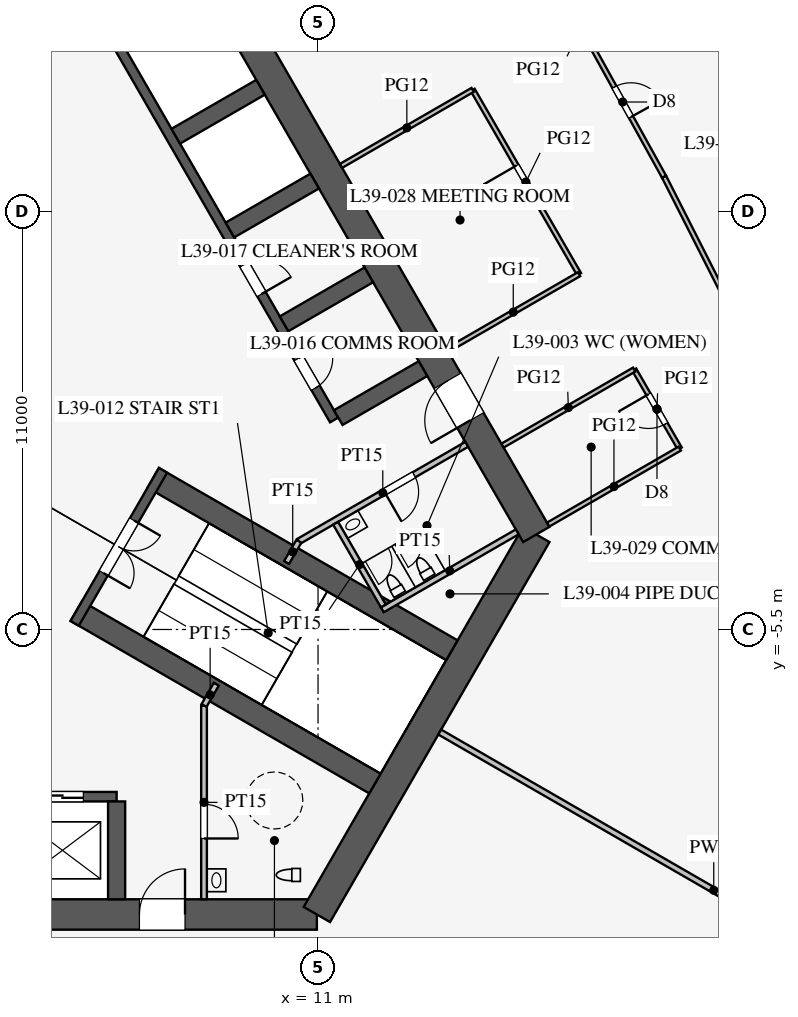
"""IFC4 building model, lengths in metres.
Left out: names, types, materials, properties, quantities, classifications, styles, units other than length and angle.
Written with IfcOpenShell. Run it as: python <this file> out.ifc"""

import sys

from ifc_helpers import new_model, si_unit, direction, frame, frame_2d, origin, place, context, subcontext, project, spatial, rectangle, extrude, element, fill, save


model = new_model("IFC4")
c1 = context("Model", 3, precision=1e-05, world=origin(), true_north=direction((0.0, 1.0)))
c2 = subcontext(c1, "Body", "Model", "MODEL_VIEW")
j1 = project(units=[si_unit("LENGTHUNIT", "METRE"), si_unit("PLANEANGLEUNIT", "RADIAN")], contexts=[c1])
p1 = place(None, origin())
s1 = spatial("IfcSite", under=j1, at=p1, CompositionType="ELEMENT")
p2 = place(p1, origin())
s2 = spatial("IfcBuilding", under=s1, at=p2, CompositionType="ELEMENT")
p3 = place(p2, frame((0.0, 0.0, 170.3)))
s3 = spatial("IfcBuildingStorey", under=s2, at=p3, CompositionType="ELEMENT", Elevation=170.3)
p4 = place(p3, frame((-10.97, -13.0, 0.0), z_axis=(0.0, 0.0, 1.0), x_axis=(1.0, 0.0, 0.0)))
e1 = element("IfcWall", 1, at=p4, inside=s3, PredefinedType="SHEAR", context=c2, shape_type="SweptSolid", body=[
    extrude(rectangle(XDim=21.939, YDim=0.8, at=frame_2d((10.97, 0.0))), origin(), (0.0, 0.0, 1.0), 4.2),
])
p5 = place(p4, frame((17.27, 0.0, 0.0)))
e2 = element("IfcOpeningElement", 2, at=p5, cuts=e1, PredefinedType="OPENING", context=c2, shape_type="SweptSolid", body=[
    extrude(rectangle(XDim=1.2, YDim=2.1, at=frame_2d((0.6, 1.05))), frame((0.0, 0.41, 0.0), z_axis=(0.0, -1.0, 0.0), x_axis=(1.0, 0.0, 0.0)), (0.0, 0.0, 1.0), 0.82),
])
p6 = place(p4, frame((3.47, 0.0, 0.0)))
e3 = element("IfcOpeningElement", 3, at=p6, cuts=e1, PredefinedType="OPENING", context=c2, shape_type="SweptSolid", body=[
    extrude(rectangle(XDim=1.2, YDim=2.1, at=frame_2d((0.6, 1.05))), frame((0.0, 0.41, 0.0), z_axis=(0.0, -1.0, 0.0), x_axis=(1.0, 0.0, 0.0)), (0.0, 0.0, 1.0), 0.82),
])
p7 = place(p3, frame((10.97, -13.0, 0.0), z_axis=(0.0, 0.0, 1.0), x_axis=(0.499995765644, 0.866027848477, 0.0)))
e4 = element("IfcWall", 4, at=p7, inside=s3, PredefinedType="SHEAR", context=c2, shape_type="SweptSolid", body=[
    extrude(rectangle(XDim=11.547, YDim=0.8, at=frame_2d((5.773, 0.0))), origin(), (0.0, 0.0, 1.0), 4.2),
])
p8 = place(p3, frame((16.743, -3.0, 0.0), z_axis=(0.0, 0.0, 1.0), x_axis=(-0.500002442456, 0.866023993627, 0.0)))
e5 = element("IfcWall", 5, at=p8, inside=s3, PredefinedType="SHEAR", context=c2, shape_type="SweptSolid", body=[
    extrude(rectangle(XDim=21.939, YDim=0.8, at=frame_2d((10.97, 0.0))), origin(), (0.0, 0.0, 1.0), 4.2),
])
p9 = place(p8, frame((17.27, 0.0, 0.0)))
e6 = element("IfcOpeningElement", 6, at=p9, cuts=e5, PredefinedType="OPENING", context=c2, shape_type="SweptSolid", body=[
    extrude(rectangle(XDim=1.2, YDim=2.1, at=frame_2d((0.6, 1.05))), frame((0.0, 0.41, 0.0), z_axis=(0.0, -1.0, 0.0), x_axis=(1.0, 0.0, 0.0)), (0.0, 0.0, 1.0), 0.82),
])
p10 = place(p8, frame((3.47, 0.0, 0.0)))
e7 = element("IfcOpeningElement", 7, at=p10, cuts=e5, PredefinedType="OPENING", context=c2, shape_type="SweptSolid", body=[
    extrude(rectangle(XDim=1.2, YDim=2.1, at=frame_2d((0.6, 1.05))), frame((0.0, 0.41, 0.0), z_axis=(0.0, -1.0, 0.0), x_axis=(1.0, 0.0, 0.0)), (0.0, 0.0, 1.0), 0.82),
])
p11 = place(p3, frame((-5.7, -9.9, 0.0), z_axis=(0.0, 0.0, 1.0), x_axis=(1.0, 0.0, 0.0)))
e8 = element("IfcWall", 8, at=p11, inside=s3, PredefinedType="SHEAR", context=c2, shape_type="SweptSolid", body=[
    extrude(rectangle(XDim=11.4, YDim=0.25, at=frame_2d((5.7, 0.0))), origin(), (0.0, 0.0, 1.0), 4.2),
])
p12 = place(p11, frame((0.875, 0.0, 0.0)))
e9 = element("IfcOpeningElement", 9, at=p12, cuts=e8, PredefinedType="OPENING", context=c2, shape_type="SweptSolid", body=[
    extrude(rectangle(XDim=1.1, YDim=2.2, at=frame_2d((0.55, 1.1))), frame((0.0, 0.135, 0.0), z_axis=(0.0, -1.0, 0.0), x_axis=(1.0, 0.0, 0.0)), (0.0, 0.0, 1.0), 0.27),
])
p13 = place(p11, frame((3.725, 0.0, 0.0)))
e10 = element("IfcOpeningElement", 10, at=p13, cuts=e8, PredefinedType="OPENING", context=c2, shape_type="SweptSolid", body=[
    extrude(rectangle(XDim=1.1, YDim=2.2, at=frame_2d((0.55, 1.1))), frame((0.0, 0.135, 0.0), z_axis=(0.0, -1.0, 0.0), x_axis=(1.0, 0.0, 0.0)), (0.0, 0.0, 1.0), 0.27),
])
p14 = place(p11, frame((6.575, 0.0, 0.0)))
e11 = element("IfcOpeningElement", 11, at=p14, cuts=e8, PredefinedType="OPENING", context=c2, shape_type="SweptSolid", body=[
    extrude(rectangle(XDim=1.1, YDim=2.2, at=frame_2d((0.55, 1.1))), frame((0.0, 0.135, 0.0), z_axis=(0.0, -1.0, 0.0), x_axis=(1.0, 0.0, 0.0)), (0.0, 0.0, 1.0), 0.27),
])
p15 = place(p11, frame((9.425, 0.0, 0.0)))
e12 = element("IfcOpeningElement", 12, at=p15, cuts=e8, PredefinedType="OPENING", context=c2, shape_type="SweptSolid", body=[
    extrude(rectangle(XDim=1.1, YDim=2.2, at=frame_2d((0.55, 1.1))), frame((0.0, 0.135, 0.0), z_axis=(0.0, -1.0, 0.0), x_axis=(1.0, 0.0, 0.0)), (0.0, 0.0, 1.0), 0.27),
])
p16 = place(p3, frame((5.7, -10.025, 0.0), z_axis=(0.0, 0.0, 1.0), x_axis=(0.0, -1.0, 0.0)))
e13 = element("IfcWall", 13, at=p16, inside=s3, PredefinedType="SHEAR", context=c2, shape_type="SweptSolid", body=[
    extrude(rectangle(XDim=2.575, YDim=0.45, at=frame_2d((1.288, 0.0))), origin(), (0.0, 0.0, 1.0), 4.2),
])
p17 = place(p3, frame((11.424, 0.014, 0.0), z_axis=(0.0, 0.0, 1.0), x_axis=(-0.500001763848, 0.866024385424, 0.0)))
e14 = element("IfcWall", 14, at=p17, inside=s3, PredefinedType="SHEAR", context=c2, shape_type="SweptSolid", body=[
    extrude(rectangle(XDim=11.4, YDim=0.25, at=frame_2d((5.7, 0.0))), origin(), (0.0, 0.0, 1.0), 4.2),
])
p18 = place(p17, frame((0.975, 0.0, 0.0)))
e15 = element("IfcOpeningElement", 15, at=p18, cuts=e14, PredefinedType="OPENING", context=c2, shape_type="SweptSolid", body=[
    extrude(rectangle(XDim=0.9, YDim=2.1, at=frame_2d((0.45, 1.05))), frame((0.0, 0.135, 0.0), z_axis=(0.0, -1.0, 0.0), x_axis=(1.0, 0.0, 0.0)), (0.0, 0.0, 1.0), 0.27),
])
p19 = place(p17, frame((3.825, 0.0, 0.0)))
e16 = element("IfcOpeningElement", 16, at=p19, cuts=e14, PredefinedType="OPENING", context=c2, shape_type="SweptSolid", body=[
    extrude(rectangle(XDim=0.9, YDim=2.1, at=frame_2d((0.45, 1.05))), frame((0.0, 0.135, 0.0), z_axis=(0.0, -1.0, 0.0), x_axis=(1.0, 0.0, 0.0)), (0.0, 0.0, 1.0), 0.27),
])
for number, where, z_axis, x_axis in (
    (17, (11.532, 0.076, 0.0), (0.0, 0.0, 1.0), (0.866, 0.5, 0.0)),
    (18, (10.107, 2.544, 0.0), (0.0, 0.0, 1.0), (0.866, 0.5, 0.0)),
    (19, (8.682, 5.012, 0.0), (0.0, 0.0, 1.0), (0.866, 0.5, 0.0)),
    (20, (7.257, 7.481, 0.0), (0.0, 0.0, 1.0), (0.866, 0.5, 0.0)),
):
    element("IfcWall", number, at=place(p3, frame(where, z_axis=z_axis, x_axis=x_axis)), inside=s3, PredefinedType="SHEAR", context=c2, shape_type="SweptSolid", body=[
        extrude(rectangle(XDim=2.575, YDim=0.45, at=frame_2d((1.288, 0.0))), origin(), (0.0, 0.0, 1.0), 4.2),
    ])
for number, where, z_axis, x_axis in (
    (21, (4.638, -5.016, 0.0), (0.0, 0.0, 1.0), (0.866, -0.5, 0.0)),
    (22, (6.663, -1.509, 0.0), (0.0, 0.0, 1.0), (0.866, -0.5, 0.0)),
):
    element("IfcWall", number, at=place(p3, frame(where, z_axis=z_axis, x_axis=x_axis)), inside=s3, PredefinedType="SHEAR", context=c2, shape_type="SweptSolid", body=[
        extrude(rectangle(XDim=9.075, YDim=0.6, at=frame_2d((4.538, 0.0))), origin(), (0.0, 0.0, 1.0), 4.2),
    ])
p20 = place(p3, frame((4.597, -5.339, 0.0), z_axis=(0.0, 0.0, 1.0), x_axis=(0.499984536904, 0.866034331223, 0.0)))
e23 = element("IfcWall", 23, at=p20, inside=s3, PredefinedType="SHEAR", context=c2, shape_type="SweptSolid", body=[
    extrude(rectangle(XDim=4.65, YDim=0.25, at=frame_2d((2.325, 0.0))), origin(), (0.0, 0.0, 1.0), 4.2),
])
p21 = place(p20, frame((1.525, 0.0, 0.0)))
e24 = element("IfcOpeningElement", 24, at=p21, cuts=e23, PredefinedType="OPENING", context=c2, shape_type="SweptSolid", body=[
    extrude(rectangle(XDim=1.6, YDim=2.1, at=frame_2d((0.8, 1.05))), frame((0.0, 0.135, 0.0), z_axis=(0.0, -1.0, 0.0), x_axis=(1.0, 0.0, 0.0)), (0.0, 0.0, 1.0), 0.27),
])
p22 = place(p3, frame((8.0, -7.5, 0.0), z_axis=(0.0, 0.0, 1.0), x_axis=(0.0, -1.0, 0.0)))
e25 = element("IfcWall", 25, at=p22, inside=s3, PredefinedType="PARTITIONING", context=c2, shape_type="SweptSolid", body=[
    extrude(rectangle(XDim=5.1, YDim=0.15, at=frame_2d((2.55, 0.0))), origin(), (0.0, 0.0, 1.0), 4.0),
])
p23 = place(p22, frame((2.6, 0.0, 0.0)))
e26 = element("IfcOpeningElement", 26, at=p23, cuts=e25, PredefinedType="OPENING", context=c2, shape_type="SweptSolid", body=[
    extrude(rectangle(XDim=0.9, YDim=2.1, at=frame_2d((0.45, 1.05))), frame((0.0, 0.085, 0.0), z_axis=(0.0, -1.0, 0.0), x_axis=(1.0, 0.0, 0.0)), (0.0, 0.0, 1.0), 0.17),
])
p24 = place(p3, frame((10.495, -3.178, 0.0), z_axis=(0.0, 0.0, 1.0), x_axis=(0.86602216432, 0.500005610874, 0.0)))
e27 = element("IfcWall", 27, at=p24, inside=s3, PredefinedType="PARTITIONING", context=c2, shape_type="SweptSolid", body=[
    extrude(rectangle(XDim=5.1, YDim=0.15, at=frame_2d((2.55, 0.0))), origin(), (0.0, 0.0, 1.0), 4.0),
])
p25 = place(p24, frame((2.6, 0.0, 0.0)))
e28 = element("IfcOpeningElement", 28, at=p25, cuts=e27, PredefinedType="OPENING", context=c2, shape_type="SweptSolid", body=[
    extrude(rectangle(XDim=0.9, YDim=2.1, at=frame_2d((0.45, 1.05))), frame((0.0, 0.085, 0.0), z_axis=(0.0, -1.0, 0.0), x_axis=(1.0, 0.0, 0.0)), (0.0, 0.0, 1.0), 0.17),
])
for number, where, z_axis, x_axis in (
    (29, (8.0, -7.5, 0.0), (0.0, 0.0, 1.0), (0.5, 0.866, 0.0)),
    (30, (10.495, -3.178, 0.0), (0.0, 0.0, 1.0), (-0.5, -0.866, 0.0)),
):
    element("IfcWall", number, at=place(p3, frame(where, z_axis=z_axis, x_axis=x_axis)), inside=s3, PredefinedType="PARTITIONING", context=c2, shape_type="SweptSolid", body=[
        extrude(rectangle(XDim=0.645, YDim=0.15, at=frame_2d((0.323, 0.0))), origin(), (0.0, 0.0, 1.0), 4.0),
    ])
p26 = place(p3, frame((12.691, -4.982, 0.0), z_axis=(0.0, 0.0, 1.0), x_axis=(0.8660249478, 0.500000789788, 0.0)))
e31 = element("IfcWall", 31, at=p26, inside=s3, PredefinedType="PARTITIONING", context=c2, shape_type="SweptSolid", body=[
    extrude(rectangle(XDim=4.1, YDim=0.15, at=frame_2d((2.05, 0.0))), origin(), (0.0, 0.0, 1.0), 4.0),
])
p27 = place(p3, frame((11.464, -2.706, 0.0), z_axis=(0.0, 0.0, 1.0), x_axis=(0.50001992892, -0.866013897511, 0.0)))
e32 = element("IfcWall", 32, at=p27, inside=s3, PredefinedType="PARTITIONING", context=c2, shape_type="SweptSolid", body=[
    extrude(rectangle(XDim=2.51, YDim=0.15, at=frame_2d((1.255, 0.0))), origin(), (0.0, 0.0, 1.0), 4.0),
])
p28 = place(p3, frame((14.203, -8.2, 0.0), z_axis=(0.0, 0.0, 1.0), x_axis=(0.866024668836, -0.500001272966, 0.0)))
e33 = element("IfcWall", 33, at=p28, inside=s3, PredefinedType="PARTITIONING", context=c2, shape_type="SweptSolid", body=[
    extrude(rectangle(XDim=16.65, YDim=0.15, at=frame_2d((8.325, 0.0))), origin(), (0.0, 0.0, 1.0), 2.3),
])
p29 = place(p3, frame((20.519, -0.74, 0.0), z_axis=(0.0, 0.0, 1.0), x_axis=(-0.499957262057, 0.866050077142, 0.0)))
e34 = element("IfcWall", 34, at=p29, inside=s3, PredefinedType="PARTITIONING", context=c2, shape_type="SweptSolid", body=[
    extrude(rectangle(XDim=2.4, YDim=0.12, at=frame_2d((1.2, 0.0))), origin(), (0.0, 0.0, 1.0), 2.9),
])
p30 = place(p29, frame((0.75, 0.0, 0.15)))
e35 = element("IfcOpeningElement", 35, at=p30, cuts=e34, PredefinedType="OPENING", context=c2, shape_type="SweptSolid", body=[
    extrude(rectangle(XDim=0.9, YDim=2.1, at=frame_2d((0.45, 1.05))), frame((0.0, 0.07, 0.0), z_axis=(0.0, -1.0, 0.0), x_axis=(1.0, 0.0, 0.0)), (0.0, 0.0, 1.0), 0.14),
])
p31 = place(p3, frame((17.869, 3.85, 0.0), z_axis=(0.0, 0.0, 1.0), x_axis=(-0.500016814911, 0.866015695474, 0.0)))
e36 = element("IfcWall", 36, at=p31, inside=s3, PredefinedType="PARTITIONING", context=c2, shape_type="SweptSolid", body=[
    extrude(rectangle(XDim=5.6, YDim=0.12, at=frame_2d((2.8, 0.0))), origin(), (0.0, 0.0, 1.0), 2.9),
])
p32 = place(p31, frame((2.3, 0.0, 0.15)))
e37 = element("IfcOpeningElement", 37, at=p32, cuts=e36, PredefinedType="OPENING", context=c2, shape_type="SweptSolid", body=[
    extrude(rectangle(XDim=1.0, YDim=2.1, at=frame_2d((0.5, 1.05))), frame((0.0, 0.07, 0.0), z_axis=(0.0, -1.0, 0.0), x_axis=(1.0, 0.0, 0.0)), (0.0, 0.0, 1.0), 0.14),
])
p33 = place(p3, frame((11.605, 6.7, 0.0), z_axis=(0.0, 0.0, 1.0), x_axis=(0.866026010844, 0.49999894854, 0.0)))
e38 = element("IfcWall", 38, at=p33, inside=s3, PredefinedType="PARTITIONING", context=c2, shape_type="SweptSolid", body=[
    extrude(rectangle(XDim=4.0, YDim=0.12, at=frame_2d((2.0, 0.0))), origin(), (0.0, 0.0, 1.0), 2.6),
])
for number, where, z_axis, x_axis in (
    (39, (17.055, -2.74, 0.0), (0.0, 0.0, 1.0), (0.866, 0.5, 0.0)),
    (40, (14.405, 1.85, 0.0), (0.0, 0.0, 1.0), (0.866, 0.5, 0.0)),
    (41, (15.855, -0.661, 0.0), (0.0, 0.0, 1.0), (0.866, 0.5, 0.0)),
):
    element("IfcWall", number, at=place(p3, frame(where, z_axis=z_axis, x_axis=x_axis)), inside=s3, PredefinedType="PARTITIONING", context=c2, shape_type="SweptSolid", body=[
        extrude(rectangle(XDim=4.0, YDim=0.12, at=frame_2d((2.0, 0.0))), origin(), (0.0, 0.0, 1.0), 2.9),
    ])
p34 = place(p3, frame((20.106, 6.412, 0.0), z_axis=(0.0, 0.0, 1.0), x_axis=(-0.484292898211, 0.874905931368, 0.0)))
e42 = element("IfcWall", 42, at=p34, inside=s3, PredefinedType="PARTITIONING", context=c2, shape_type="SweptSolid", body=[
    extrude(rectangle(XDim=4.501, YDim=0.12, at=frame_2d((2.25, 0.0))), origin(), (0.0, 0.0, 1.0), 2.9),
])
p35 = place(p34, frame((1.8, 0.0, 0.15)))
e43 = element("IfcOpeningElement", 43, at=p35, cuts=e42, PredefinedType="OPENING", context=c2, shape_type="SweptSolid", body=[
    extrude(rectangle(XDim=0.9, YDim=2.1, at=frame_2d((0.45, 1.05))), frame((0.0, 0.07, 0.0), z_axis=(0.0, -1.0, 0.0), x_axis=(1.0, 0.0, 0.0)), (0.0, 0.0, 1.0), 0.14),
])
p36 = place(p3, frame((22.145, 2.393, 0.0), z_axis=(0.0, 0.0, 1.0), x_axis=(-0.452471679136, 0.891778772779, 0.0)))
e44 = element("IfcWall", 44, at=p36, inside=s3, PredefinedType="PARTITIONING", context=c2, shape_type="SweptSolid", body=[
    extrude(rectangle(XDim=4.507, YDim=0.12, at=frame_2d((2.253, 0.0))), origin(), (0.0, 0.0, 1.0), 2.9),
])
p37 = place(p23, origin())
e45 = element("IfcDoor", 45, at=p37, inside=s3, OperationType="SINGLE_SWING_RIGHT", PredefinedType="DOOR", context=c2, shape_type="SweptSolid", body=[
    extrude(rectangle(XDim=0.9, YDim=2.1, at=frame_2d((0.45, 1.05))), frame((0.0, 0.025, 0.0), z_axis=(0.0, -1.0, 0.0), x_axis=(1.0, 0.0, 0.0)), (0.0, 0.0, 1.0), 0.05),
])
fill(e26, e45)
p38 = place(p25, frame((0.9, 0.0, 0.0), z_axis=(0.0, 0.0, 1.0), x_axis=(-1.0, 0.0, 0.0)))
e46 = element("IfcDoor", 46, at=p38, inside=s3, OperationType="SINGLE_SWING_RIGHT", PredefinedType="DOOR", context=c2, shape_type="SweptSolid", body=[
    extrude(rectangle(XDim=0.9, YDim=2.1, at=frame_2d((0.45, 1.05))), frame((0.0, 0.025, 0.0), z_axis=(0.0, -1.0, 0.0), x_axis=(1.0, 0.0, 0.0)), (0.0, 0.0, 1.0), 0.05),
])
fill(e28, e46)
p39 = place(p21, frame((1.6, 0.0, 0.0), z_axis=(0.0, 0.0, 1.0), x_axis=(-1.0, 0.0, 0.0)))
e47 = element("IfcDoor", 47, at=p39, inside=s3, OperationType="DOUBLE_DOOR_SINGLE_SWING", PredefinedType="DOOR", context=c2, shape_type="SweptSolid", body=[
    extrude(rectangle(XDim=1.6, YDim=2.1, at=frame_2d((0.8, 1.05))), frame((0.0, 0.025, 0.0), z_axis=(0.0, -1.0, 0.0), x_axis=(1.0, 0.0, 0.0)), (0.0, 0.0, 1.0), 0.05),
])
fill(e24, e47)
p40 = place(p5, origin())
e48 = element("IfcDoor", 48, at=p40, inside=s3, OperationType="SINGLE_SWING_RIGHT", PredefinedType="DOOR", context=c2, shape_type="SweptSolid", body=[
    extrude(rectangle(XDim=1.2, YDim=2.1, at=frame_2d((0.6, 1.05))), frame((0.0, 0.025, 0.0), z_axis=(0.0, -1.0, 0.0), x_axis=(1.0, 0.0, 0.0)), (0.0, 0.0, 1.0), 0.05),
])
fill(e2, e48)
p41 = place(p10, origin())
e49 = element("IfcDoor", 49, at=p41, inside=s3, OperationType="SINGLE_SWING_LEFT", PredefinedType="DOOR", context=c2, shape_type="SweptSolid", body=[
    extrude(rectangle(XDim=1.2, YDim=2.1, at=frame_2d((0.6, 1.05))), frame((0.0, 0.025, 0.0), z_axis=(0.0, -1.0, 0.0), x_axis=(1.0, 0.0, 0.0)), (0.0, 0.0, 1.0), 0.05),
])
fill(e7, e49)
p42 = place(p18, frame((0.9, 0.0, 0.0), z_axis=(0.0, 0.0, 1.0), x_axis=(-1.0, 0.0, 0.0)))
e50 = element("IfcDoor", 50, at=p42, inside=s3, OperationType="SINGLE_SWING_LEFT", PredefinedType="DOOR", context=c2, shape_type="SweptSolid", body=[
    extrude(rectangle(XDim=0.9, YDim=2.1, at=frame_2d((0.45, 1.05))), frame((0.0, 0.025, 0.0), z_axis=(0.0, -1.0, 0.0), x_axis=(1.0, 0.0, 0.0)), (0.0, 0.0, 1.0), 0.05),
])
fill(e15, e50)
p43 = place(p19, frame((0.9, 0.0, 0.0), z_axis=(0.0, 0.0, 1.0), x_axis=(-1.0, 0.0, 0.0)))
e51 = element("IfcDoor", 51, at=p43, inside=s3, OperationType="SINGLE_SWING_RIGHT", PredefinedType="DOOR", context=c2, shape_type="SweptSolid", body=[
    extrude(rectangle(XDim=0.9, YDim=2.1, at=frame_2d((0.45, 1.05))), frame((0.0, 0.025, 0.0), z_axis=(0.0, -1.0, 0.0), x_axis=(1.0, 0.0, 0.0)), (0.0, 0.0, 1.0), 0.05),
])
fill(e16, e51)
p44 = place(p32, origin())
e52 = element("IfcDoor", 52, at=p44, inside=s3, OperationType="SINGLE_SWING_RIGHT", PredefinedType="DOOR", context=c2, shape_type="SweptSolid", body=[
    extrude(rectangle(XDim=1.0, YDim=2.1, at=frame_2d((0.5, 1.05))), frame((0.0, 0.025, 0.0), z_axis=(0.0, -1.0, 0.0), x_axis=(1.0, 0.0, 0.0)), (0.0, 0.0, 1.0), 0.05),
])
fill(e37, e52)
p45 = place(p30, origin())
e53 = element("IfcDoor", 53, at=p45, inside=s3, OperationType="SINGLE_SWING_RIGHT", PredefinedType="DOOR", context=c2, shape_type="SweptSolid", body=[
    extrude(rectangle(XDim=0.9, YDim=2.1, at=frame_2d((0.45, 1.05))), frame((0.0, 0.025, 0.0), z_axis=(0.0, -1.0, 0.0), x_axis=(1.0, 0.0, 0.0)), (0.0, 0.0, 1.0), 0.05),
])
fill(e35, e53)
p46 = place(p35, frame((0.9, 0.0, 0.0), z_axis=(0.0, 0.0, 1.0), x_axis=(-1.0, 0.0, 0.0)))
e54 = element("IfcDoor", 54, at=p46, inside=s3, OperationType="SINGLE_SWING_RIGHT", PredefinedType="DOOR", context=c2, shape_type="SweptSolid", body=[
    extrude(rectangle(XDim=0.9, YDim=2.1, at=frame_2d((0.45, 1.05))), frame((0.0, 0.025, 0.0), z_axis=(0.0, -1.0, 0.0), x_axis=(1.0, 0.0, 0.0)), (0.0, 0.0, 1.0), 0.05),
])
fill(e43, e54)
p47 = place(p15, origin())
e55 = element("IfcDoor", 55, at=p47, inside=s3, OperationType="DOUBLE_DOOR_SLIDING", PredefinedType="DOOR", context=c2, shape_type="SweptSolid", body=[
    extrude(rectangle(XDim=1.1, YDim=2.2, at=frame_2d((0.55, 1.1))), frame((0.0, 0.025, 0.0), z_axis=(0.0, -1.0, 0.0), x_axis=(1.0, 0.0, 0.0)), (0.0, 0.0, 1.0), 0.05),
])
fill(e12, e55)
save(model, sys.argv[1])
